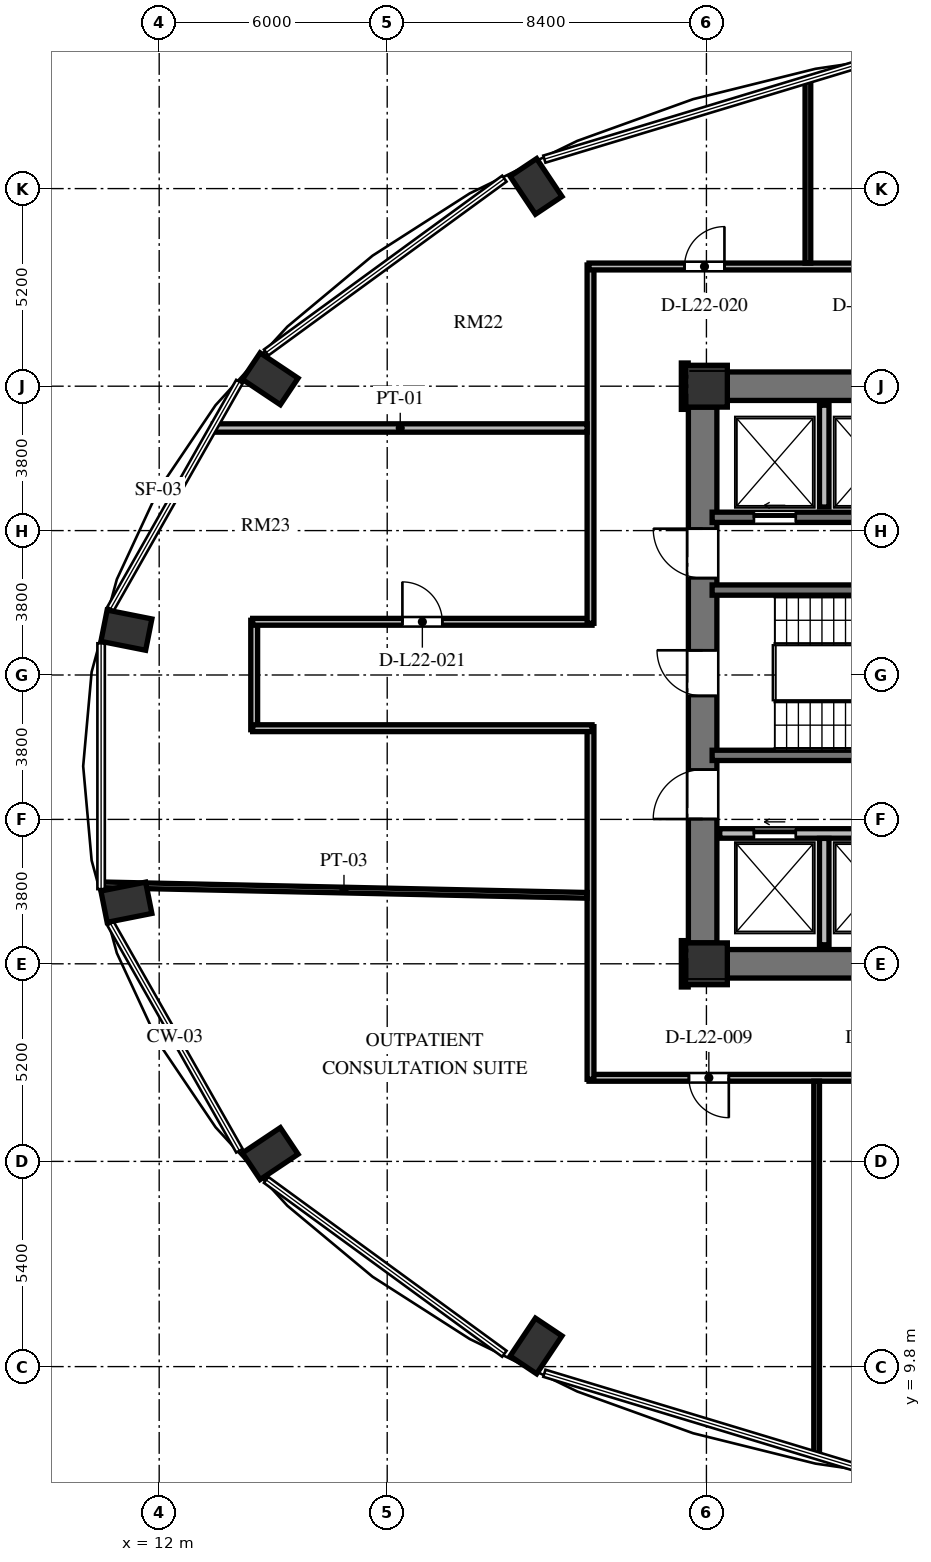
"""IFC4 building model, lengths in metres.
Left out: names, types, materials, properties, quantities, classifications, styles, units other than length and angle.
Written with IfcOpenShell. Run it as: python <this file> out.ifc"""

import sys

from ifc_helpers import new_model, si_unit, direction, frame, frame_2d, origin, origin_2d, place, context, subcontext, project, spatial, rectangle, extrude, element, fill, save


model = new_model("IFC4")
c1 = context("Model", 3, precision=1e-05, world=origin(), true_north=direction((0.0, 1.0)))
c2 = subcontext(c1, "Body", "Model", "MODEL_VIEW")
j1 = project(units=[si_unit("LENGTHUNIT", "METRE"), si_unit("PLANEANGLEUNIT", "RADIAN")], contexts=[c1])
p1 = place(None, origin())
s1 = spatial("IfcSite", under=j1, at=p1, CompositionType="ELEMENT")
p2 = place(p1, origin())
s2 = spatial("IfcBuilding", under=s1, at=p2, CompositionType="ELEMENT")
p3 = place(p2, frame((0.0, 0.0, 89.04)))
s3 = spatial("IfcBuildingStorey", under=s2, at=p3, CompositionType="ELEMENT", Elevation=89.04)
for number, where, z_axis, x_axis in (
    (1, (21.916, 40.857, 0.0), (0.0, 0.0, 1.0), (-0.556, 0.831, 0.0)),
    (2, (14.922, 35.795, 0.0), (0.0, 0.0, 1.0), (-0.831, 0.556, 0.0)),
    (3, (11.137, 29.18, 0.0), (0.0, 0.0, 1.0), (-0.981, 0.195, 0.0)),
    (4, (11.137, 22.02, 0.0), (0.0, 0.0, 1.0), (-0.981, -0.195, 0.0)),
    (5, (14.922, 15.405, 0.0), (0.0, 0.0, 1.0), (-0.831, -0.556, 0.0)),
    (6, (21.916, 10.343, 0.0), (0.0, 0.0, 1.0), (-0.556, -0.831, 0.0)),
):
    element("IfcColumn", number, at=place(p3, frame(where, z_axis=z_axis, x_axis=x_axis)), inside=s3, PredefinedType="COLUMN", context=c2, shape_type="SweptSolid", body=[
        extrude(rectangle(XDim=1.2, YDim=0.84, at=origin_2d()), origin(), (0.0, 0.0, 1.0), 3.648),
    ])
for number, where, z_axis, x_axis in (
    (7, (26.4, 20.4, 0.0), (0.0, 0.0, 1.0), (1.0, 0.0, 0.0)),
    (8, (26.4, 35.6, 0.0), (0.0, 0.0, 1.0), (1.0, 0.0, 0.0)),
):
    element("IfcColumn", number, at=place(p3, frame(where, z_axis=z_axis, x_axis=x_axis)), inside=s3, PredefinedType="COLUMN", context=c2, shape_type="SweptSolid", body=[
        extrude(rectangle(XDim=1.1, YDim=1.1, at=origin_2d()), origin(), (0.0, 0.0, 1.0), 3.648),
    ])
p4 = place(p3, frame((26.3, 20.95, 0.0), z_axis=(0.0, 0.0, 1.0), x_axis=(0.0, 1.0, 0.0)))
e9 = element("IfcWall", 9, at=p4, inside=s3, PredefinedType="SHEAR", context=c2, shape_type="SweptSolid", body=[
    extrude(rectangle(XDim=14.1, YDim=0.75, at=frame_2d((7.05, 0.0))), origin(), (0.0, 0.0, 1.0), 3.648),
])
p5 = place(p4, frame((6.5, 0.0, 0.0)))
e10 = element("IfcOpeningElement", 10, at=p5, cuts=e9, PredefinedType="OPENING", context=c2, shape_type="SweptSolid", body=[
    extrude(rectangle(XDim=1.2, YDim=2.15, at=frame_2d((0.6, 1.075))), frame((0.0, 0.385, 0.0), z_axis=(0.0, -1.0, 0.0), x_axis=(1.0, 0.0, 0.0)), (0.0, 0.0, 1.0), 0.77),
])
p6 = place(p4, frame((9.6, 0.0, 0.0)))
e11 = element("IfcOpeningElement", 11, at=p6, cuts=e9, PredefinedType="OPENING", context=c2, shape_type="SweptSolid", body=[
    extrude(rectangle(XDim=1.3, YDim=2.2, at=frame_2d((0.65, 1.1))), frame((0.0, 0.385, 0.0), z_axis=(0.0, -1.0, 0.0), x_axis=(1.0, 0.0, 0.0)), (0.0, 0.0, 1.0), 0.77),
])
p7 = place(p4, frame((3.26, 0.0, 0.0)))
e12 = element("IfcOpeningElement", 12, at=p7, cuts=e9, PredefinedType="OPENING", context=c2, shape_type="SweptSolid", body=[
    extrude(rectangle(XDim=1.3, YDim=2.2, at=frame_2d((0.65, 1.1))), frame((0.0, 0.385, 0.0), z_axis=(0.0, -1.0, 0.0), x_axis=(1.0, 0.0, 0.0)), (0.0, 0.0, 1.0), 0.77),
])
for number, where, z_axis, x_axis in (
    (13, (26.95, 20.4, 0.0), (0.0, 0.0, 1.0), (1.0, 0.0, 0.0)),
    (14, (26.95, 35.6, 0.0), (0.0, 0.0, 1.0), (1.0, 0.0, 0.0)),
):
    element("IfcWall", number, at=place(p3, frame(where, z_axis=z_axis, x_axis=x_axis)), inside=s3, PredefinedType="SHEAR", context=c2, shape_type="SweptSolid", body=[
        extrude(rectangle(XDim=5.375, YDim=0.75, at=frame_2d((2.688, 0.0))), origin(), (0.0, 0.0, 1.0), 3.648),
    ])
for number, where, z_axis, x_axis in (
    (15, (26.55, 30.235, 0.0), (0.0, 0.0, 1.0), (1.0, 0.0, 0.0)),
    (16, (26.55, 25.885, 0.0), (0.0, 0.0, 1.0), (1.0, 0.0, 0.0)),
):
    element("IfcWall", number, at=place(p3, frame(where, z_axis=z_axis, x_axis=x_axis)), inside=s3, PredefinedType="SHEAR", context=c2, shape_type="SweptSolid", body=[
        extrude(rectangle(XDim=7.985, YDim=0.27, at=frame_2d((3.992, 0.0))), origin(), (0.0, 0.0, 1.0), 3.648),
    ])
p8 = place(p3, frame((26.55, 32.15, 0.0), z_axis=(0.0, 0.0, 1.0), x_axis=(1.0, 0.0, 0.0)))
e17 = element("IfcWall", 17, at=p8, inside=s3, PredefinedType="SHEAR", context=c2, shape_type="SweptSolid", body=[
    extrude(rectangle(XDim=16.4, YDim=0.27, at=frame_2d((8.2, 0.0))), origin(), (0.0, 0.0, 1.0), 3.648),
])
p9 = place(p8, frame((1.1, 0.0, 0.0)))
e18 = element("IfcOpeningElement", 18, at=p9, cuts=e17, PredefinedType="OPENING", context=c2, shape_type="SweptSolid", body=[
    extrude(rectangle(XDim=1.1, YDim=2.2, at=frame_2d((0.55, 1.1))), frame((0.0, 0.145, 0.0), z_axis=(0.0, -1.0, 0.0), x_axis=(1.0, 0.0, 0.0)), (0.0, 0.0, 1.0), 0.29),
])
p10 = place(p8, frame((3.7, 0.0, 0.0)))
e19 = element("IfcOpeningElement", 19, at=p10, cuts=e17, PredefinedType="OPENING", context=c2, shape_type="SweptSolid", body=[
    extrude(rectangle(XDim=1.1, YDim=2.2, at=frame_2d((0.55, 1.1))), frame((0.0, 0.145, 0.0), z_axis=(0.0, -1.0, 0.0), x_axis=(1.0, 0.0, 0.0)), (0.0, 0.0, 1.0), 0.29),
])
p11 = place(p8, frame((6.5, 0.0, 0.0)))
e20 = element("IfcOpeningElement", 20, at=p11, cuts=e17, PredefinedType="OPENING", context=c2, shape_type="SweptSolid", body=[
    extrude(rectangle(XDim=1.1, YDim=2.2, at=frame_2d((0.55, 1.1))), frame((0.0, 0.145, 0.0), z_axis=(0.0, -1.0, 0.0), x_axis=(1.0, 0.0, 0.0)), (0.0, 0.0, 1.0), 0.29),
])
p12 = place(p8, frame((9.1, 0.0, 0.0)))
e21 = element("IfcOpeningElement", 21, at=p12, cuts=e17, PredefinedType="OPENING", context=c2, shape_type="SweptSolid", body=[
    extrude(rectangle(XDim=1.1, YDim=2.2, at=frame_2d((0.55, 1.1))), frame((0.0, 0.145, 0.0), z_axis=(0.0, -1.0, 0.0), x_axis=(1.0, 0.0, 0.0)), (0.0, 0.0, 1.0), 0.29),
])
p13 = place(p8, frame((11.9, 0.0, 0.0)))
e22 = element("IfcOpeningElement", 22, at=p13, cuts=e17, PredefinedType="OPENING", context=c2, shape_type="SweptSolid", body=[
    extrude(rectangle(XDim=1.1, YDim=2.2, at=frame_2d((0.55, 1.1))), frame((0.0, 0.145, 0.0), z_axis=(0.0, -1.0, 0.0), x_axis=(1.0, 0.0, 0.0)), (0.0, 0.0, 1.0), 0.29),
])
p14 = place(p8, frame((14.5, 0.0, 0.0)))
e23 = element("IfcOpeningElement", 23, at=p14, cuts=e17, PredefinedType="OPENING", context=c2, shape_type="SweptSolid", body=[
    extrude(rectangle(XDim=1.1, YDim=2.2, at=frame_2d((0.55, 1.1))), frame((0.0, 0.145, 0.0), z_axis=(0.0, -1.0, 0.0), x_axis=(1.0, 0.0, 0.0)), (0.0, 0.0, 1.0), 0.29),
])
p15 = place(p3, frame((26.75, 23.83, 0.0), z_axis=(0.0, 0.0, 1.0), x_axis=(1.0, 0.0, 0.0)))
e24 = element("IfcWall", 24, at=p15, inside=s3, PredefinedType="SOLIDWALL", context=c2, shape_type="SweptSolid", body=[
    extrude(rectangle(XDim=16.2, YDim=0.25, at=frame_2d((8.1, 0.0))), origin(), (0.0, 0.0, 1.0), 3.428),
])
p16 = place(p15, frame((0.9, 0.0, 0.0)))
e25 = element("IfcOpeningElement", 25, at=p16, cuts=e24, PredefinedType="OPENING", context=c2, shape_type="SweptSolid", body=[
    extrude(rectangle(XDim=1.1, YDim=2.2, at=frame_2d((0.55, 1.1))), frame((0.0, 0.135, 0.0), z_axis=(0.0, -1.0, 0.0), x_axis=(1.0, 0.0, 0.0)), (0.0, 0.0, 1.0), 0.27),
])
p17 = place(p15, frame((3.5, 0.0, 0.0)))
e26 = element("IfcOpeningElement", 26, at=p17, cuts=e24, PredefinedType="OPENING", context=c2, shape_type="SweptSolid", body=[
    extrude(rectangle(XDim=1.1, YDim=2.2, at=frame_2d((0.55, 1.1))), frame((0.0, 0.135, 0.0), z_axis=(0.0, -1.0, 0.0), x_axis=(1.0, 0.0, 0.0)), (0.0, 0.0, 1.0), 0.27),
])
p18 = place(p15, frame((6.3, 0.0, 0.0)))
e27 = element("IfcOpeningElement", 27, at=p18, cuts=e24, PredefinedType="OPENING", context=c2, shape_type="SweptSolid", body=[
    extrude(rectangle(XDim=1.1, YDim=2.2, at=frame_2d((0.55, 1.1))), frame((0.0, 0.135, 0.0), z_axis=(0.0, -1.0, 0.0), x_axis=(1.0, 0.0, 0.0)), (0.0, 0.0, 1.0), 0.27),
])
p19 = place(p15, frame((8.9, 0.0, 0.0)))
e28 = element("IfcOpeningElement", 28, at=p19, cuts=e24, PredefinedType="OPENING", context=c2, shape_type="SweptSolid", body=[
    extrude(rectangle(XDim=1.1, YDim=2.2, at=frame_2d((0.55, 1.1))), frame((0.0, 0.135, 0.0), z_axis=(0.0, -1.0, 0.0), x_axis=(1.0, 0.0, 0.0)), (0.0, 0.0, 1.0), 0.27),
])
p20 = place(p15, frame((11.7, 0.0, 0.0)))
e29 = element("IfcOpeningElement", 29, at=p20, cuts=e24, PredefinedType="OPENING", context=c2, shape_type="SweptSolid", body=[
    extrude(rectangle(XDim=1.1, YDim=2.2, at=frame_2d((0.55, 1.1))), frame((0.0, 0.135, 0.0), z_axis=(0.0, -1.0, 0.0), x_axis=(1.0, 0.0, 0.0)), (0.0, 0.0, 1.0), 0.27),
])
p21 = place(p15, frame((14.15, 0.0, 0.0)))
e30 = element("IfcOpeningElement", 30, at=p21, cuts=e24, PredefinedType="OPENING", context=c2, shape_type="SweptSolid", body=[
    extrude(rectangle(XDim=1.4, YDim=2.3, at=frame_2d((0.7, 1.15))), frame((0.0, 0.135, 0.0), z_axis=(0.0, -1.0, 0.0), x_axis=(1.0, 0.0, 0.0)), (0.0, 0.0, 1.0), 0.27),
])
p22 = place(p3, frame((29.5, 32.42, 0.0), z_axis=(0.0, 0.0, 1.0), x_axis=(0.0, 1.0, 0.0)))
e31 = element("IfcWall", 31, at=p22, inside=s3, PredefinedType="SOLIDWALL", context=c2, shape_type="SweptSolid", body=[
    extrude(rectangle(XDim=2.68, YDim=0.25, at=frame_2d((1.34, 0.0))), origin(), (0.0, 0.0, 1.0), 3.428),
])
p23 = place(p3, frame((29.5, 20.9, 0.0), z_axis=(0.0, 0.0, 1.0), x_axis=(0.0, 1.0, 0.0)))
e32 = element("IfcWall", 32, at=p23, inside=s3, PredefinedType="SOLIDWALL", context=c2, shape_type="SweptSolid", body=[
    extrude(rectangle(XDim=2.8, YDim=0.25, at=frame_2d((1.4, 0.0))), origin(), (0.0, 0.0, 1.0), 3.428),
])
p24 = place(p3, frame((14.5, 26.56, 0.0), z_axis=(0.0, 0.0, 1.0), x_axis=(0.0, 1.0, 0.0)))
e33 = element("IfcWall", 33, at=p24, inside=s3, PredefinedType="PARTITIONING", context=c2, shape_type="SweptSolid", body=[
    extrude(rectangle(XDim=2.88, YDim=0.18, at=frame_2d((1.44, 0.0))), origin(), (0.0, 0.0, 1.0), 3.013),
])
p25 = place(p3, frame((14.46, 29.4, 0.0), z_axis=(0.0, 0.0, 1.0), x_axis=(1.0, 0.0, 0.0)))
e34 = element("IfcWall", 34, at=p25, inside=s3, PredefinedType="PARTITIONING", context=c2, shape_type="SweptSolid", body=[
    extrude(rectangle(XDim=8.93, YDim=0.18, at=frame_2d((4.465, 0.0))), origin(), (0.0, 0.0, 1.0), 3.428),
])
p26 = place(p25, frame((3.94, 0.0, 0.0)))
e35 = element("IfcOpeningElement", 35, at=p26, cuts=e34, PredefinedType="OPENING", context=c2, shape_type="SweptSolid", body=[
    extrude(rectangle(XDim=1.05, YDim=2.15, at=frame_2d((0.525, 1.075))), frame((0.0, 0.1, 0.0), z_axis=(0.0, -1.0, 0.0), x_axis=(1.0, 0.0, 0.0)), (0.0, 0.0, 1.0), 0.2),
])
p27 = place(p3, frame((23.35, 29.36, 0.0), z_axis=(0.0, 0.0, 1.0), x_axis=(0.0, 1.0, 0.0)))
e36 = element("IfcWall", 36, at=p27, inside=s3, PredefinedType="PARTITIONING", context=c2, shape_type="SweptSolid", body=[
    extrude(rectangle(XDim=9.43, YDim=0.18, at=frame_2d((4.715, 0.0))), origin(), (0.0, 0.0, 1.0), 3.428),
])
p28 = place(p3, frame((23.31, 38.75, 0.0), z_axis=(0.0, 0.0, 1.0), x_axis=(1.0, 0.0, 0.0)))
e37 = element("IfcWall", 37, at=p28, inside=s3, PredefinedType="PARTITIONING", context=c2, shape_type="SweptSolid", body=[
    extrude(rectangle(XDim=29.88, YDim=0.18, at=frame_2d((14.94, 0.0))), origin(), (0.0, 0.0, 1.0), 3.053),
])
p29 = place(p28, frame((26.066, 0.0, 0.0)))
e38 = element("IfcOpeningElement", 38, at=p29, cuts=e37, PredefinedType="OPENING", context=c2, shape_type="SweptSolid", body=[
    extrude(rectangle(XDim=1.05, YDim=2.15, at=frame_2d((0.525, 1.075))), frame((0.0, 0.1, 0.0), z_axis=(0.0, -1.0, 0.0), x_axis=(1.0, 0.0, 0.0)), (0.0, 0.0, 1.0), 0.2),
])
p30 = place(p28, frame((21.31, 0.0, 0.0)))
e39 = element("IfcOpeningElement", 39, at=p30, cuts=e37, PredefinedType="OPENING", context=c2, shape_type="SweptSolid", body=[
    extrude(rectangle(XDim=1.05, YDim=2.15, at=frame_2d((0.525, 1.075))), frame((0.0, 0.1, 0.0), z_axis=(0.0, -1.0, 0.0), x_axis=(1.0, 0.0, 0.0)), (0.0, 0.0, 1.0), 0.2),
])
p31 = place(p28, frame((17.74, 0.0, 0.0)))
e40 = element("IfcOpeningElement", 40, at=p31, cuts=e37, PredefinedType="OPENING", context=c2, shape_type="SweptSolid", body=[
    extrude(rectangle(XDim=1.05, YDim=2.15, at=frame_2d((0.525, 1.075))), frame((0.0, 0.1, 0.0), z_axis=(0.0, -1.0, 0.0), x_axis=(1.0, 0.0, 0.0)), (0.0, 0.0, 1.0), 0.2),
])
p32 = place(p28, frame((12.38, 0.0, 0.0)))
e41 = element("IfcOpeningElement", 41, at=p32, cuts=e37, PredefinedType="OPENING", context=c2, shape_type="SweptSolid", body=[
    extrude(rectangle(XDim=1.05, YDim=2.15, at=frame_2d((0.525, 1.075))), frame((0.0, 0.1, 0.0), z_axis=(0.0, -1.0, 0.0), x_axis=(1.0, 0.0, 0.0)), (0.0, 0.0, 1.0), 0.2),
])
p33 = place(p28, frame((7.02, 0.0, 0.0)))
e42 = element("IfcOpeningElement", 42, at=p33, cuts=e37, PredefinedType="OPENING", context=c2, shape_type="SweptSolid", body=[
    extrude(rectangle(XDim=1.05, YDim=2.15, at=frame_2d((0.525, 1.075))), frame((0.0, 0.1, 0.0), z_axis=(0.0, -1.0, 0.0), x_axis=(1.0, 0.0, 0.0)), (0.0, 0.0, 1.0), 0.2),
])
p34 = place(p28, frame((2.514, 0.0, 0.0)))
e43 = element("IfcOpeningElement", 43, at=p34, cuts=e37, PredefinedType="OPENING", context=c2, shape_type="SweptSolid", body=[
    extrude(rectangle(XDim=1.05, YDim=2.15, at=frame_2d((0.525, 1.075))), frame((0.0, 0.1, 0.0), z_axis=(0.0, -1.0, 0.0), x_axis=(1.0, 0.0, 0.0)), (0.0, 0.0, 1.0), 0.2),
])
for number, where, z_axis, x_axis in (
    (44, (25.83, 36.21, 0.0), (0.0, 0.0, 1.0), (0.0, -1.0, 0.0)),
    (45, (25.83, 21.01, 0.0), (0.0, 0.0, 1.0), (0.0, -1.0, 0.0)),
):
    element("IfcWall", number, at=place(p3, frame(where, z_axis=z_axis, x_axis=x_axis)), inside=s3, PredefinedType="PARTITIONING", context=c2, shape_type="SweptSolid", body=[
        extrude(rectangle(XDim=1.22, YDim=0.18, at=frame_2d((0.61, 0.0))), origin(), (0.0, 0.0, 1.0), 3.428),
    ])
p35 = place(p3, frame((45.24, 17.4, 0.0), z_axis=(0.0, 0.0, 1.0), x_axis=(-1.0, 0.0, 0.0)))
e46 = element("IfcWall", 46, at=p35, inside=s3, PredefinedType="PARTITIONING", context=c2, shape_type="SweptSolid", body=[
    extrude(rectangle(XDim=21.93, YDim=0.18, at=frame_2d((10.965, 0.0))), origin(), (0.0, 0.0, 1.0), 3.053),
])
p36 = place(p35, frame((18.251, 0.0, 0.0)))
e47 = element("IfcOpeningElement", 47, at=p36, cuts=e46, PredefinedType="OPENING", context=c2, shape_type="SweptSolid", body=[
    extrude(rectangle(XDim=1.05, YDim=2.15, at=frame_2d((0.525, 1.075))), frame((0.0, 0.1, 0.0), z_axis=(0.0, -1.0, 0.0), x_axis=(1.0, 0.0, 0.0)), (0.0, 0.0, 1.0), 0.2),
])
p37 = place(p35, frame((13.515, 0.0, 0.0)))
e48 = element("IfcOpeningElement", 48, at=p37, cuts=e46, PredefinedType="OPENING", context=c2, shape_type="SweptSolid", body=[
    extrude(rectangle(XDim=1.05, YDim=2.15, at=frame_2d((0.525, 1.075))), frame((0.0, 0.1, 0.0), z_axis=(0.0, -1.0, 0.0), x_axis=(1.0, 0.0, 0.0)), (0.0, 0.0, 1.0), 0.2),
])
p38 = place(p35, frame((9.515, 0.0, 0.0)))
e49 = element("IfcOpeningElement", 49, at=p38, cuts=e46, PredefinedType="OPENING", context=c2, shape_type="SweptSolid", body=[
    extrude(rectangle(XDim=1.05, YDim=2.15, at=frame_2d((0.525, 1.075))), frame((0.0, 0.1, 0.0), z_axis=(0.0, -1.0, 0.0), x_axis=(1.0, 0.0, 0.0)), (0.0, 0.0, 1.0), 0.2),
])
p39 = place(p35, frame((4.743, 0.0, 0.0)))
e50 = element("IfcOpeningElement", 50, at=p39, cuts=e46, PredefinedType="OPENING", context=c2, shape_type="SweptSolid", body=[
    extrude(rectangle(XDim=1.4, YDim=2.2, at=frame_2d((0.7, 1.1))), frame((0.0, 0.1, 0.0), z_axis=(0.0, -1.0, 0.0), x_axis=(1.0, 0.0, 0.0)), (0.0, 0.0, 1.0), 0.2),
])
p40 = place(p35, frame((1.907, 0.0, 0.0)))
e51 = element("IfcOpeningElement", 51, at=p40, cuts=e46, PredefinedType="OPENING", context=c2, shape_type="SweptSolid", body=[
    extrude(rectangle(XDim=1.05, YDim=2.15, at=frame_2d((0.525, 1.075))), frame((0.0, 0.1, 0.0), z_axis=(0.0, -1.0, 0.0), x_axis=(1.0, 0.0, 0.0)), (0.0, 0.0, 1.0), 0.2),
])
p41 = place(p3, frame((23.35, 17.36, 0.0), z_axis=(0.0, 0.0, 1.0), x_axis=(0.0, 1.0, 0.0)))
e52 = element("IfcWall", 52, at=p41, inside=s3, PredefinedType="PARTITIONING", context=c2, shape_type="SweptSolid", body=[
    extrude(rectangle(XDim=9.28, YDim=0.18, at=frame_2d((4.64, 0.0))), origin(), (0.0, 0.0, 1.0), 3.428),
])
p42 = place(p3, frame((23.39, 26.6, 0.0), z_axis=(0.0, 0.0, 1.0), x_axis=(-1.0, 0.0, 0.0)))
e53 = element("IfcWall", 53, at=p42, inside=s3, PredefinedType="PARTITIONING", context=c2, shape_type="SweptSolid", body=[
    extrude(rectangle(XDim=8.93, YDim=0.18, at=frame_2d((4.465, 0.0))), origin(), (0.0, 0.0, 1.0), 3.428),
])
p43 = place(p3, frame((10.465, 22.479, 0.0), z_axis=(0.0, 0.0, 1.0), x_axis=(0.999765147572, -0.021671402821, 0.0)))
e54 = element("IfcWall", 54, at=p43, inside=s3, PredefinedType="PARTITIONING", context=c2, shape_type="SweptSolid", body=[
    extrude(rectangle(XDim=12.798, YDim=0.15, at=frame_2d((6.399, 0.0))), origin(), (0.0, 0.0, 1.0), 3.428),
])
p44 = place(p3, frame((13.426, 34.5, 0.0), z_axis=(0.0, 0.0, 1.0), x_axis=(1.0, 0.0, 0.0)))
e55 = element("IfcWall", 55, at=p44, inside=s3, PredefinedType="PARTITIONING", context=c2, shape_type="SweptSolid", body=[
    extrude(rectangle(XDim=9.834, YDim=0.22, at=frame_2d((4.917, 0.0))), origin(), (0.0, 0.0, 1.0), 3.428),
])
p45 = place(p3, frame((29.07, 38.84, 0.0), z_axis=(0.0, 0.0, 1.0), x_axis=(0.0, 1.0, 0.0)))
e56 = element("IfcWall", 56, at=p45, inside=s3, PredefinedType="PARTITIONING", context=c2, shape_type="SweptSolid", body=[
    extrude(rectangle(XDim=4.817, YDim=0.15, at=frame_2d((2.409, 0.0))), origin(), (0.0, 0.0, 1.0), 3.428),
])
p46 = place(p3, frame((29.3, 7.473, 0.0), z_axis=(0.0, 0.0, 1.0), x_axis=(0.0, 1.0, 0.0)))
e57 = element("IfcWall", 57, at=p46, inside=s3, PredefinedType="PARTITIONING", context=c2, shape_type="SweptSolid", body=[
    extrude(rectangle(XDim=9.837, YDim=0.15, at=frame_2d((4.918, 0.0))), origin(), (0.0, 0.0, 1.0), 3.428),
])
p47 = place(p5, origin())
e58 = element("IfcDoor", 58, at=p47, inside=s3, OperationType="SINGLE_SWING_RIGHT", PredefinedType="DOOR", context=c2, shape_type="SweptSolid", body=[
    extrude(rectangle(XDim=1.2, YDim=2.15, at=frame_2d((0.6, 1.075))), frame((0.0, 0.025, 0.0), z_axis=(0.0, -1.0, 0.0), x_axis=(1.0, 0.0, 0.0)), (0.0, 0.0, 1.0), 0.05),
])
fill(e10, e58)
p48 = place(p6, origin())
e59 = element("IfcDoor", 59, at=p48, inside=s3, OperationType="SINGLE_SWING_RIGHT", PredefinedType="DOOR", context=c2, shape_type="SweptSolid", body=[
    extrude(rectangle(XDim=1.3, YDim=2.2, at=frame_2d((0.65, 1.1))), frame((0.0, 0.025, 0.0), z_axis=(0.0, -1.0, 0.0), x_axis=(1.0, 0.0, 0.0)), (0.0, 0.0, 1.0), 0.05),
])
fill(e11, e59)
p49 = place(p7, origin())
e60 = element("IfcDoor", 60, at=p49, inside=s3, OperationType="SINGLE_SWING_LEFT", PredefinedType="DOOR", context=c2, shape_type="SweptSolid", body=[
    extrude(rectangle(XDim=1.3, YDim=2.2, at=frame_2d((0.65, 1.1))), frame((0.0, 0.025, 0.0), z_axis=(0.0, -1.0, 0.0), x_axis=(1.0, 0.0, 0.0)), (0.0, 0.0, 1.0), 0.05),
])
fill(e12, e60)
p50 = place(p9, origin())
e61 = element("IfcDoor", 61, at=p50, inside=s3, OperationType="SLIDING_TO_LEFT", PredefinedType="DOOR", context=c2, shape_type="SweptSolid", body=[
    extrude(rectangle(XDim=1.1, YDim=2.2, at=frame_2d((0.55, 1.1))), frame((0.0, 0.025, 0.0), z_axis=(0.0, -1.0, 0.0), x_axis=(1.0, 0.0, 0.0)), (0.0, 0.0, 1.0), 0.05),
])
fill(e18, e61)
p51 = place(p16, origin())
e62 = element("IfcDoor", 62, at=p51, inside=s3, OperationType="SLIDING_TO_LEFT", PredefinedType="DOOR", context=c2, shape_type="SweptSolid", body=[
    extrude(rectangle(XDim=1.1, YDim=2.2, at=frame_2d((0.55, 1.1))), frame((0.0, 0.025, 0.0), z_axis=(0.0, -1.0, 0.0), x_axis=(1.0, 0.0, 0.0)), (0.0, 0.0, 1.0), 0.05),
])
fill(e25, e62)
p52 = place(p36, origin())
e63 = element("IfcDoor", 63, at=p52, inside=s3, OperationType="SINGLE_SWING_LEFT", PredefinedType="DOOR", context=c2, shape_type="SweptSolid", body=[
    extrude(rectangle(XDim=1.05, YDim=2.15, at=frame_2d((0.525, 1.075))), frame((0.0, 0.025, 0.0), z_axis=(0.0, -1.0, 0.0), x_axis=(1.0, 0.0, 0.0)), (0.0, 0.0, 1.0), 0.05),
])
fill(e47, e63)
p53 = place(p34, origin())
e64 = element("IfcDoor", 64, at=p53, inside=s3, OperationType="SINGLE_SWING_RIGHT", PredefinedType="DOOR", context=c2, shape_type="SweptSolid", body=[
    extrude(rectangle(XDim=1.05, YDim=2.15, at=frame_2d((0.525, 1.075))), frame((0.0, 0.025, 0.0), z_axis=(0.0, -1.0, 0.0), x_axis=(1.0, 0.0, 0.0)), (0.0, 0.0, 1.0), 0.05),
])
fill(e43, e64)
p54 = place(p26, origin())
e65 = element("IfcDoor", 65, at=p54, inside=s3, OperationType="SINGLE_SWING_LEFT", PredefinedType="DOOR", context=c2, shape_type="SweptSolid", body=[
    extrude(rectangle(XDim=1.05, YDim=2.15, at=frame_2d((0.525, 1.075))), frame((0.0, 0.025, 0.0), z_axis=(0.0, -1.0, 0.0), x_axis=(1.0, 0.0, 0.0)), (0.0, 0.0, 1.0), 0.05),
])
fill(e35, e65)
save(model, sys.argv[1])
